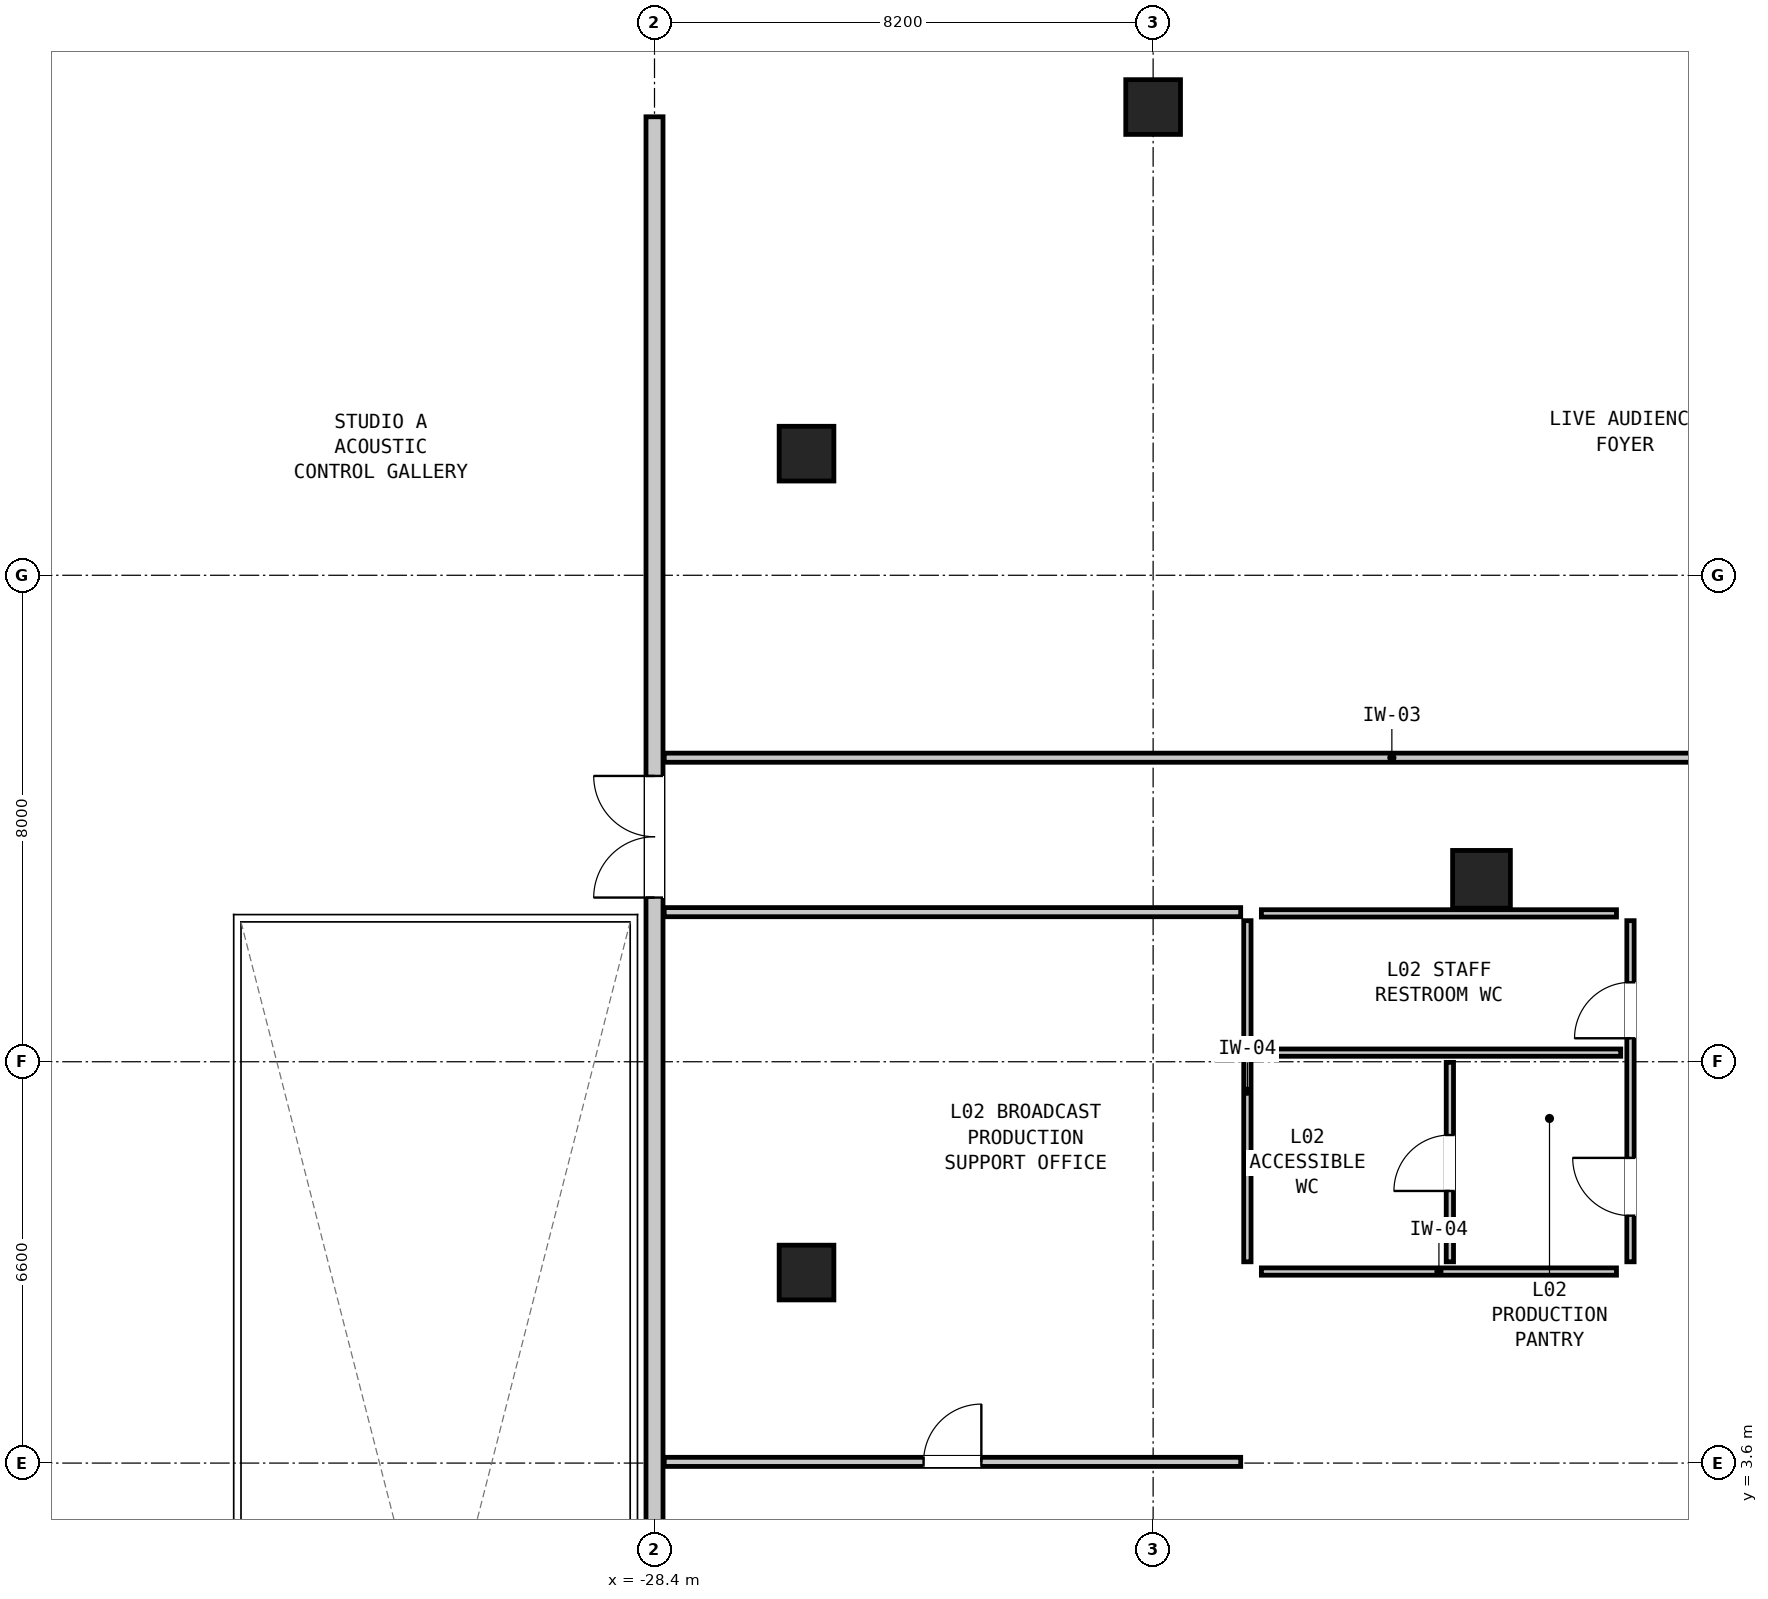
"""IFC4 building model, lengths in metres.
Left out: names, types, materials, properties, quantities, classifications, styles, units other than length and angle.
Written with IfcOpenShell. Run it as: python <this file> out.ifc"""

import sys

from ifc_helpers import new_model, si_unit, direction, frame, frame_2d, origin, origin_2d, place, context, subcontext, project, spatial, rectangle, hollow_rectangle, extrude, element, fill, save


model = new_model("IFC4")
c1 = context("Model", 3, precision=1e-05, world=origin(), true_north=direction((0.0, 1.0)))
c2 = subcontext(c1, "Body", "Model", "MODEL_VIEW")
j1 = project(units=[si_unit("LENGTHUNIT", "METRE"), si_unit("PLANEANGLEUNIT", "RADIAN")], contexts=[c1])
p1 = place(None, origin())
s1 = spatial("IfcSite", under=j1, at=p1, CompositionType="ELEMENT")
p2 = place(p1, origin())
s2 = spatial("IfcBuilding", under=s1, at=p2, CompositionType="ELEMENT")
p3 = place(p2, frame((0.0, 0.0, 9.3)))
s3 = spatial("IfcBuildingStorey", under=s2, at=p3, CompositionType="ELEMENT", Elevation=9.3)
p4 = place(p3, frame((-14.8, 13.2, 0.0), z_axis=(0.0, 0.0, 1.0), x_axis=(1.0, 0.0, 0.0)))
e1 = element("IfcColumn", 1, at=p4, inside=s3, PredefinedType="COLUMN", context=c2, shape_type="SweptSolid", body=[
    extrude(hollow_rectangle(XDim=0.95, YDim=0.95, WallThickness=0.06, at=origin_2d()), origin(), (0.0, 0.0, 1.0), 4.2),
])
for number, where, z_axis, x_axis in (
    (2, (-20.2, 25.9, 0.0), (0.0, 0.0, 1.0), (1.0, 0.0, 0.0)),
    (3, (-25.9, 20.2, 0.0), (0.0, 0.0, 1.0), (0.0, 1.0, 0.0)),
    (4, (-25.9, 6.733, 0.0), (0.0, 0.0, 1.0), (0.0, 1.0, 0.0)),
):
    element("IfcColumn", number, at=place(p3, frame(where, z_axis=z_axis, x_axis=x_axis)), inside=s3, PredefinedType="COLUMN", context=c2, shape_type="SweptSolid", body=[
        extrude(hollow_rectangle(XDim=0.9, YDim=0.9, WallThickness=0.055, at=origin_2d()), origin(), (0.0, 0.0, 1.0), 4.2),
    ])
for number, where, z_axis, x_axis in (
    (5, (-18.42, 6.75, 0.0), (0.0, 0.0, 1.0), (1.0, 0.0, 0.0)),
    (6, (-18.42, 12.64, 0.0), (0.0, 0.0, 1.0), (1.0, 0.0, 0.0)),
):
    element("IfcWall", number, at=place(p3, frame(where, z_axis=z_axis, x_axis=x_axis)), inside=s3, PredefinedType="PARTITIONING", context=c2, shape_type="SweptSolid", body=[
        extrude(rectangle(XDim=5.84, YDim=0.12, at=frame_2d((2.92, 0.0))), origin(), (0.0, 0.0, 1.0), 3.88),
    ])
p5 = place(p3, frame((-18.65, 6.91, 0.0), z_axis=(0.0, 0.0, 1.0), x_axis=(0.0, 1.0, 0.0)))
e7 = element("IfcWall", 7, at=p5, inside=s3, PredefinedType="PARTITIONING", context=c2, shape_type="SweptSolid", body=[
    extrude(rectangle(XDim=5.61, YDim=0.12, at=frame_2d((2.805, 0.0))), origin(), (0.0, 0.0, 1.0), 3.88),
])
p6 = place(p3, frame((-18.49, 10.35, 0.0), z_axis=(0.0, 0.0, 1.0), x_axis=(1.0, 0.0, 0.0)))
e8 = element("IfcWall", 8, at=p6, inside=s3, PredefinedType="PARTITIONING", context=c2, shape_type="SweptSolid", body=[
    extrude(rectangle(XDim=5.98, YDim=0.12, at=frame_2d((2.99, 0.0))), origin(), (0.0, 0.0, 1.0), 3.88),
])
p7 = place(p3, frame((-15.32, 6.91, 0.0), z_axis=(0.0, 0.0, 1.0), x_axis=(0.0, 1.0, 0.0)))
e9 = element("IfcWall", 9, at=p7, inside=s3, PredefinedType="PARTITIONING", context=c2, shape_type="SweptSolid", body=[
    extrude(rectangle(XDim=3.28, YDim=0.12, at=frame_2d((1.64, 0.0))), origin(), (0.0, 0.0, 1.0), 3.88),
])
p8 = place(p7, frame((1.165, 0.0, 0.0)))
e10 = element("IfcOpeningElement", 10, at=p8, cuts=e9, PredefinedType="OPENING", context=c2, shape_type="SweptSolid", body=[
    extrude(rectangle(XDim=0.92, YDim=2.1, at=frame_2d((0.46, 1.05))), frame((0.0, 0.072, 0.0), z_axis=(0.0, -1.0, 0.0), x_axis=(1.0, 0.0, 0.0)), (0.0, 0.0, 1.0), 0.144),
])
p9 = place(p3, frame((-12.35, 6.91, 0.0), z_axis=(0.0, 0.0, 1.0), x_axis=(0.0, 1.0, 0.0)))
e11 = element("IfcWall", 11, at=p9, inside=s3, PredefinedType="PARTITIONING", context=c2, shape_type="SweptSolid", body=[
    extrude(rectangle(XDim=5.61, YDim=0.12, at=frame_2d((2.805, 0.0))), origin(), (0.0, 0.0, 1.0), 3.88),
])
p10 = place(p9, frame((0.759, 0.0, 0.0)))
e12 = element("IfcOpeningElement", 12, at=p10, cuts=e11, PredefinedType="OPENING", context=c2, shape_type="SweptSolid", body=[
    extrude(rectangle(XDim=0.95, YDim=2.1, at=frame_2d((0.475, 1.05))), frame((0.0, 0.072, 0.0), z_axis=(0.0, -1.0, 0.0), x_axis=(1.0, 0.0, 0.0)), (0.0, 0.0, 1.0), 0.144),
])
p11 = place(p9, frame((3.676, 0.0, 0.0)))
e13 = element("IfcOpeningElement", 13, at=p11, cuts=e11, PredefinedType="OPENING", context=c2, shape_type="SweptSolid", body=[
    extrude(rectangle(XDim=0.92, YDim=2.1, at=frame_2d((0.46, 1.05))), frame((0.0, 0.072, 0.0), z_axis=(0.0, -1.0, 0.0), x_axis=(1.0, 0.0, 0.0)), (0.0, 0.0, 1.0), 0.144),
])
p12 = place(p3, frame((-28.4, -25.74, 0.0), z_axis=(0.0, 0.0, 1.0), x_axis=(0.0, 1.0, 0.0)))
e14 = element("IfcWall", 14, at=p12, inside=s3, PredefinedType="MOVABLE", context=c2, shape_type="SweptSolid", body=[
    extrude(rectangle(XDim=51.48, YDim=0.28, at=frame_2d((25.74, 0.0))), origin(), (0.0, 0.0, 1.0), 3.88),
])
p13 = place(p12, frame((11.149, 0.0, 0.0)))
e15 = element("IfcOpeningElement", 15, at=p13, cuts=e14, PredefinedType="OPENING", context=c2, shape_type="SweptSolid", body=[
    extrude(rectangle(XDim=2.0, YDim=2.14, at=frame_2d((1.0, 1.07))), frame((0.0, 0.152, 0.0), z_axis=(0.0, -1.0, 0.0), x_axis=(1.0, 0.0, 0.0)), (0.0, 0.0, 1.0), 0.304),
])
p14 = place(p12, frame((38.64, 0.0, 0.0)))
e16 = element("IfcOpeningElement", 16, at=p14, cuts=e14, PredefinedType="OPENING", context=c2, shape_type="SweptSolid", body=[
    extrude(rectangle(XDim=2.0, YDim=2.14, at=frame_2d((1.0, 1.07))), frame((0.0, 0.152, 0.0), z_axis=(0.0, -1.0, 0.0), x_axis=(1.0, 0.0, 0.0)), (0.0, 0.0, 1.0), 0.304),
])
p15 = place(p3, frame((-28.24, 15.2, 0.0), z_axis=(0.0, 0.0, 1.0), x_axis=(1.0, 0.0, 0.0)))
e17 = element("IfcWall", 17, at=p15, inside=s3, PredefinedType="PARTITIONING", context=c2, shape_type="SweptSolid", body=[
    extrude(rectangle(XDim=31.58, YDim=0.15, at=frame_2d((15.79, 0.0))), origin(), (0.0, 0.0, 1.0), 3.88),
])
p16 = place(p15, frame((24.032, 0.0, 0.0)))
e18 = element("IfcOpeningElement", 18, at=p16, cuts=e17, PredefinedType="OPENING", context=c2, shape_type="SweptSolid", body=[
    extrude(rectangle(XDim=1.2, YDim=2.1, at=frame_2d((0.6, 1.05))), frame((0.0, 0.087, 0.0), z_axis=(0.0, -1.0, 0.0), x_axis=(1.0, 0.0, 0.0)), (0.0, 0.0, 1.0), 0.174),
])
p17 = place(p3, frame((-28.24, 12.66, 0.0), z_axis=(0.0, 0.0, 1.0), x_axis=(1.0, 0.0, 0.0)))
e19 = element("IfcWall", 19, at=p17, inside=s3, PredefinedType="PARTITIONING", context=c2, shape_type="SweptSolid", body=[
    extrude(rectangle(XDim=9.48, YDim=0.15, at=frame_2d((4.74, 0.0))), origin(), (0.0, 0.0, 1.0), 3.88),
])
p18 = place(p3, frame((-28.24, 3.62, 0.0), z_axis=(0.0, 0.0, 1.0), x_axis=(1.0, 0.0, 0.0)))
e20 = element("IfcWall", 20, at=p18, inside=s3, PredefinedType="PARTITIONING", context=c2, shape_type="SweptSolid", body=[
    extrude(rectangle(XDim=9.48, YDim=0.15, at=frame_2d((4.74, 0.0))), origin(), (0.0, 0.0, 1.0), 2.742),
])
p19 = place(p18, frame((4.265, 0.0, 0.0)))
e21 = element("IfcOpeningElement", 21, at=p19, cuts=e20, PredefinedType="OPENING", context=c2, shape_type="SweptSolid", body=[
    extrude(rectangle(XDim=0.95, YDim=2.1, at=frame_2d((0.475, 1.05))), frame((0.0, 0.087, 0.0), z_axis=(0.0, -1.0, 0.0), x_axis=(1.0, 0.0, 0.0)), (0.0, 0.0, 1.0), 0.174),
])
p20 = place(p8, origin())
e22 = element("IfcDoor", 22, at=p20, inside=s3, OperationType="SINGLE_SWING_LEFT", PredefinedType="DOOR", context=c2, shape_type="SweptSolid", body=[
    extrude(rectangle(XDim=0.92, YDim=2.1, at=frame_2d((0.46, 1.05))), frame((0.0, 0.025, 0.0), z_axis=(0.0, -1.0, 0.0), x_axis=(1.0, 0.0, 0.0)), (0.0, 0.0, 1.0), 0.05),
])
fill(e10, e22)
p21 = place(p10, origin())
e23 = element("IfcDoor", 23, at=p21, inside=s3, OperationType="SINGLE_SWING_RIGHT", PredefinedType="DOOR", context=c2, shape_type="SweptSolid", body=[
    extrude(rectangle(XDim=0.95, YDim=2.1, at=frame_2d((0.475, 1.05))), frame((0.0, 0.025, 0.0), z_axis=(0.0, -1.0, 0.0), x_axis=(1.0, 0.0, 0.0)), (0.0, 0.0, 1.0), 0.05),
])
fill(e12, e23)
p22 = place(p11, origin())
e24 = element("IfcDoor", 24, at=p22, inside=s3, OperationType="SINGLE_SWING_LEFT", PredefinedType="DOOR", context=c2, shape_type="SweptSolid", body=[
    extrude(rectangle(XDim=0.92, YDim=2.1, at=frame_2d((0.46, 1.05))), frame((0.0, 0.025, 0.0), z_axis=(0.0, -1.0, 0.0), x_axis=(1.0, 0.0, 0.0)), (0.0, 0.0, 1.0), 0.05),
])
fill(e13, e24)
p23 = place(p14, origin())
e25 = element("IfcDoor", 25, at=p23, inside=s3, OperationType="DOUBLE_DOOR_SINGLE_SWING", PredefinedType="DOOR", context=c2, shape_type="SweptSolid", body=[
    extrude(rectangle(XDim=2.0, YDim=2.14, at=frame_2d((1.0, 1.07))), frame((0.0, 0.025, 0.0), z_axis=(0.0, -1.0, 0.0), x_axis=(1.0, 0.0, 0.0)), (0.0, 0.0, 1.0), 0.05),
])
fill(e16, e25)
p24 = place(p19, origin())
e26 = element("IfcDoor", 26, at=p24, inside=s3, OperationType="SINGLE_SWING_RIGHT", PredefinedType="DOOR", context=c2, shape_type="SweptSolid", body=[
    extrude(rectangle(XDim=0.95, YDim=2.1, at=frame_2d((0.475, 1.05))), frame((0.0, 0.025, 0.0), z_axis=(0.0, -1.0, 0.0), x_axis=(1.0, 0.0, 0.0)), (0.0, 0.0, 1.0), 0.05),
])
fill(e21, e26)
save(model, sys.argv[1])
